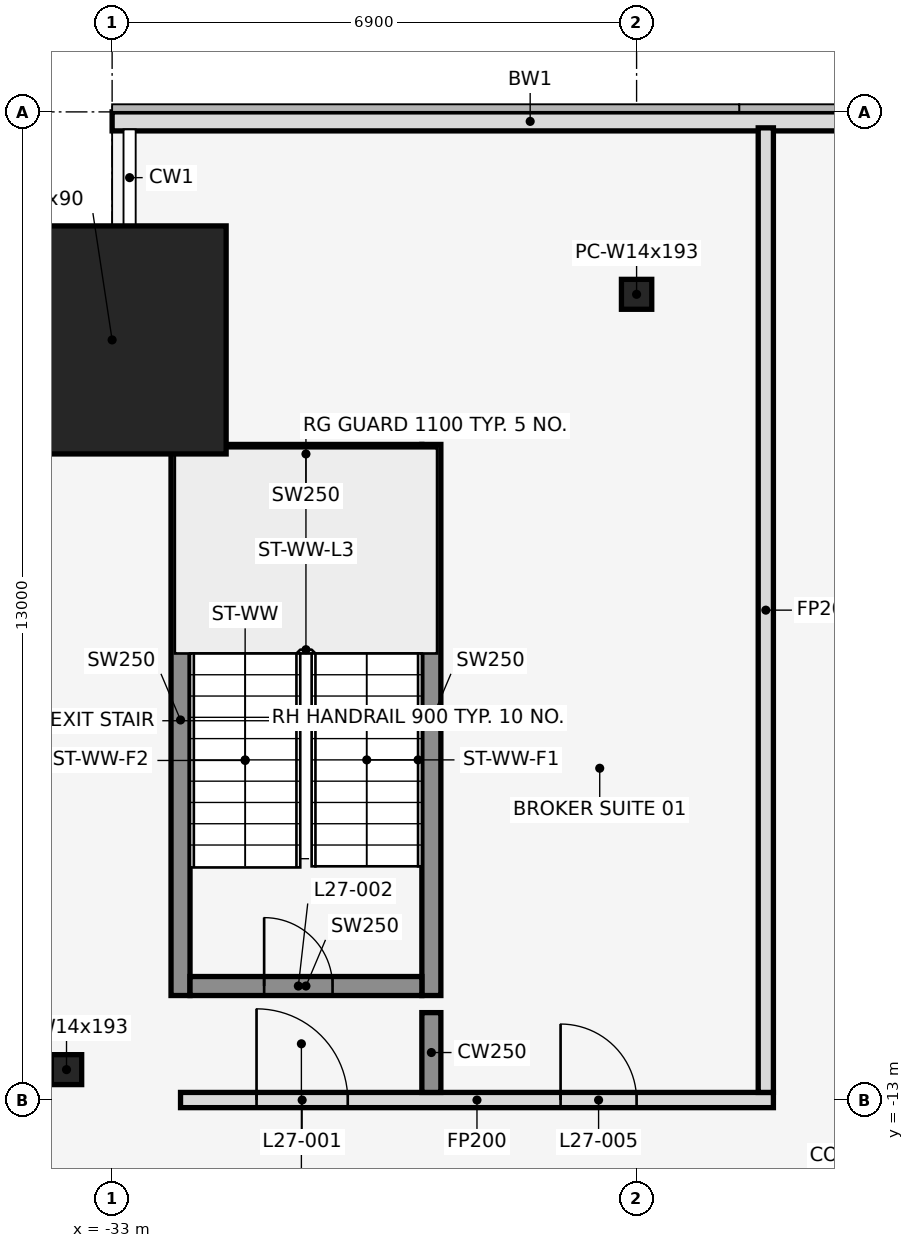
"""IFC4 building model, lengths in metres.
Left out: names, types, materials, properties, quantities, classifications, styles, units other than length and angle.
Written with IfcOpenShell. Run it as: python <this file> out.ifc"""

import sys

from ifc_helpers import new_model, si_unit, direction, frame, frame_2d, origin, origin_2d, place, context, subcontext, project, spatial, rectangle, hollow_rectangle, i_section, extrude, element, fill, save


model = new_model("IFC4")
c1 = context("Model", 3, precision=1e-05, world=origin(), true_north=direction((0.0, 1.0)))
c2 = subcontext(c1, "Body", "Model", "MODEL_VIEW")
j1 = project(units=[si_unit("LENGTHUNIT", "METRE"), si_unit("PLANEANGLEUNIT", "RADIAN")], contexts=[c1])
p1 = place(None, origin())
s1 = spatial("IfcSite", under=j1, at=p1, CompositionType="ELEMENT")
p2 = place(p1, origin())
s2 = spatial("IfcBuilding", under=s1, at=p2, CompositionType="ELEMENT")
p3 = place(p2, frame((0.0, 0.0, 126.8)))
s3 = spatial("IfcBuildingStorey", under=s2, at=p3, CompositionType="ELEMENT", Elevation=126.8)
p4 = place(p3, frame((-33.0, -3.0, 0.0), z_axis=(0.0, 0.0, 1.0), x_axis=(1.0, 0.0, 0.0)))
e1 = element("IfcColumn", 1, at=p4, inside=s3, PredefinedType="COLUMN", context=c2, shape_type="SweptSolid", body=[
    extrude(hollow_rectangle(XDim=3.0, YDim=3.0, WallThickness=0.09, at=origin_2d()), origin(), (0.0, 0.0, 1.0), 4.1),
])
for number, where, z_axis, x_axis in (
    (2, (-26.1, -2.4, 0.0), (0.0, 0.0, 1.0), (1.0, 0.0, 0.0)),
    (3, (-33.6, -12.6, 0.0), (0.0, 0.0, 1.0), (1.0, 0.0, 0.0)),
):
    element("IfcColumn", number, at=place(p3, frame(where, z_axis=z_axis, x_axis=x_axis)), inside=s3, PredefinedType="COLUMN", context=c2, shape_type="SweptSolid", body=[
        extrude(i_section(OverallWidth=0.399, OverallDepth=0.394, WebThickness=0.023, FlangeThickness=0.037, at=origin_2d()), origin(), (0.0, 0.0, 1.0), 4.1),
    ])
p5 = place(p3, frame((-22.0, -0.125, 0.0), z_axis=(0.0, 0.0, 1.0), x_axis=(-1.0, 0.0, 0.0)))
e4 = element("IfcWall", 4, at=p5, inside=s3, PredefinedType="STANDARD", context=c2, shape_type="SweptSolid", body=[
    extrude(rectangle(XDim=11.0, YDim=0.25, at=frame_2d((5.5, 0.0))), origin(), (0.0, 0.0, 1.0), 3.95),
])
for number, where, z_axis, x_axis in (
    (5, (-32.1, -11.625, 0.0), (0.0, 0.0, 1.0), (0.0, 1.0, 0.0)),
    (6, (-28.8, -11.625, 0.0), (0.0, 0.0, 1.0), (0.0, 1.0, 0.0)),
):
    element("IfcWall", number, at=place(p3, frame(where, z_axis=z_axis, x_axis=x_axis)), inside=s3, PredefinedType="SHEAR", context=c2, shape_type="SweptSolid", body=[
        extrude(rectangle(XDim=7.25, YDim=0.25, at=frame_2d((3.625, 0.0))), origin(), (0.0, 0.0, 1.0), 4.1),
    ])
p6 = place(p3, frame((-31.975, -11.5, 0.0), z_axis=(0.0, 0.0, 1.0), x_axis=(1.0, 0.0, 0.0)))
e7 = element("IfcWall", 7, at=p6, inside=s3, PredefinedType="SHEAR", context=c2, shape_type="SweptSolid", body=[
    extrude(rectangle(XDim=3.05, YDim=0.25, at=frame_2d((1.525, 0.0))), origin(), (0.0, 0.0, 1.0), 4.1),
])
p7 = place(p6, frame((0.975, 0.0, 0.0)))
e8 = element("IfcOpeningElement", 8, at=p7, cuts=e7, PredefinedType="OPENING", context=c2, shape_type="SweptSolid", body=[
    extrude(rectangle(XDim=0.9, YDim=2.1, at=frame_2d((0.45, 1.05))), frame((0.0, 0.137, 0.0), z_axis=(0.0, -1.0, 0.0), x_axis=(1.0, 0.0, 0.0)), (0.0, 0.0, 1.0), 0.274),
])
p8 = place(p3, frame((-31.975, -4.5, 0.0), z_axis=(0.0, 0.0, 1.0), x_axis=(1.0, 0.0, 0.0)))
e9 = element("IfcWall", 9, at=p8, inside=s3, PredefinedType="SHEAR", context=c2, shape_type="SweptSolid", body=[
    extrude(rectangle(XDim=3.05, YDim=0.25, at=frame_2d((1.525, 0.0))), origin(), (0.0, 0.0, 1.0), 4.1),
])
p9 = place(p3, frame((-32.1, -13.0, 0.0), z_axis=(0.0, 0.0, 1.0), x_axis=(1.0, 0.0, 0.0)))
e10 = element("IfcWall", 10, at=p9, inside=s3, PredefinedType="PARTITIONING", context=c2, shape_type="SweptSolid", body=[
    extrude(rectangle(XDim=7.8, YDim=0.2, at=frame_2d((3.9, 0.0))), origin(), (0.0, 0.0, 1.0), 2.939),
])
p10 = place(p9, frame((1.0, 0.0, 0.0)))
e11 = element("IfcOpeningElement", 11, at=p10, cuts=e10, PredefinedType="OPENING", context=c2, shape_type="SweptSolid", body=[
    extrude(rectangle(XDim=1.2, YDim=2.1, at=frame_2d((0.6, 1.05))), frame((0.0, 0.112, 0.0), z_axis=(0.0, -1.0, 0.0), x_axis=(1.0, 0.0, 0.0)), (0.0, 0.0, 1.0), 0.224),
])
p11 = place(p9, frame((5.0, 0.0, 0.0)))
e12 = element("IfcOpeningElement", 12, at=p11, cuts=e10, PredefinedType="OPENING", context=c2, shape_type="SweptSolid", body=[
    extrude(rectangle(XDim=1.0, YDim=2.1, at=frame_2d((0.5, 1.05))), frame((0.0, 0.112, 0.0), z_axis=(0.0, -1.0, 0.0), x_axis=(1.0, 0.0, 0.0)), (0.0, 0.0, 1.0), 0.224),
])
p12 = place(p3, frame((-28.8, -12.9, 0.0), z_axis=(0.0, 0.0, 1.0), x_axis=(0.0, 1.0, 0.0)))
e13 = element("IfcWall", 13, at=p12, inside=s3, PredefinedType="SHEAR", context=c2, shape_type="SweptSolid", body=[
    extrude(rectangle(XDim=1.05, YDim=0.25, at=frame_2d((0.525, 0.0))), origin(), (0.0, 0.0, 1.0), 4.1),
])
p13 = place(p3, frame((-24.4, -12.9, 0.0), z_axis=(0.0, 0.0, 1.0), x_axis=(0.0, 1.0, 0.0)))
e14 = element("IfcWall", 14, at=p13, inside=s3, PredefinedType="PARTITIONING", context=c2, shape_type="SweptSolid", body=[
    extrude(rectangle(XDim=12.69, YDim=0.2, at=frame_2d((6.345, 0.0))), origin(), (0.0, 0.0, 1.0), 2.939),
])
p14 = place(p10, origin())
e15 = element("IfcDoor", 15, at=p14, inside=s3, OperationType="SINGLE_SWING_LEFT", PredefinedType="DOOR", context=c2, shape_type="SweptSolid", body=[
    extrude(rectangle(XDim=1.2, YDim=2.1, at=frame_2d((0.6, 1.05))), frame((0.0, 0.025, 0.0), z_axis=(0.0, -1.0, 0.0), x_axis=(1.0, 0.0, 0.0)), (0.0, 0.0, 1.0), 0.05),
])
fill(e11, e15)
p15 = place(p7, origin())
e16 = element("IfcDoor", 16, at=p15, inside=s3, OperationType="SINGLE_SWING_LEFT", PredefinedType="DOOR", context=c2, shape_type="SweptSolid", body=[
    extrude(rectangle(XDim=0.9, YDim=2.1, at=frame_2d((0.45, 1.05))), frame((0.0, 0.025, 0.0), z_axis=(0.0, -1.0, 0.0), x_axis=(1.0, 0.0, 0.0)), (0.0, 0.0, 1.0), 0.05),
])
fill(e8, e16)
p16 = place(p11, origin())
e17 = element("IfcDoor", 17, at=p16, inside=s3, OperationType="SINGLE_SWING_LEFT", PredefinedType="DOOR", context=c2, shape_type="SweptSolid", body=[
    extrude(rectangle(XDim=1.0, YDim=2.1, at=frame_2d((0.5, 1.05))), frame((0.0, 0.025, 0.0), z_axis=(0.0, -1.0, 0.0), x_axis=(1.0, 0.0, 0.0)), (0.0, 0.0, 1.0), 0.05),
])
fill(e12, e17)
save(model, sys.argv[1])
